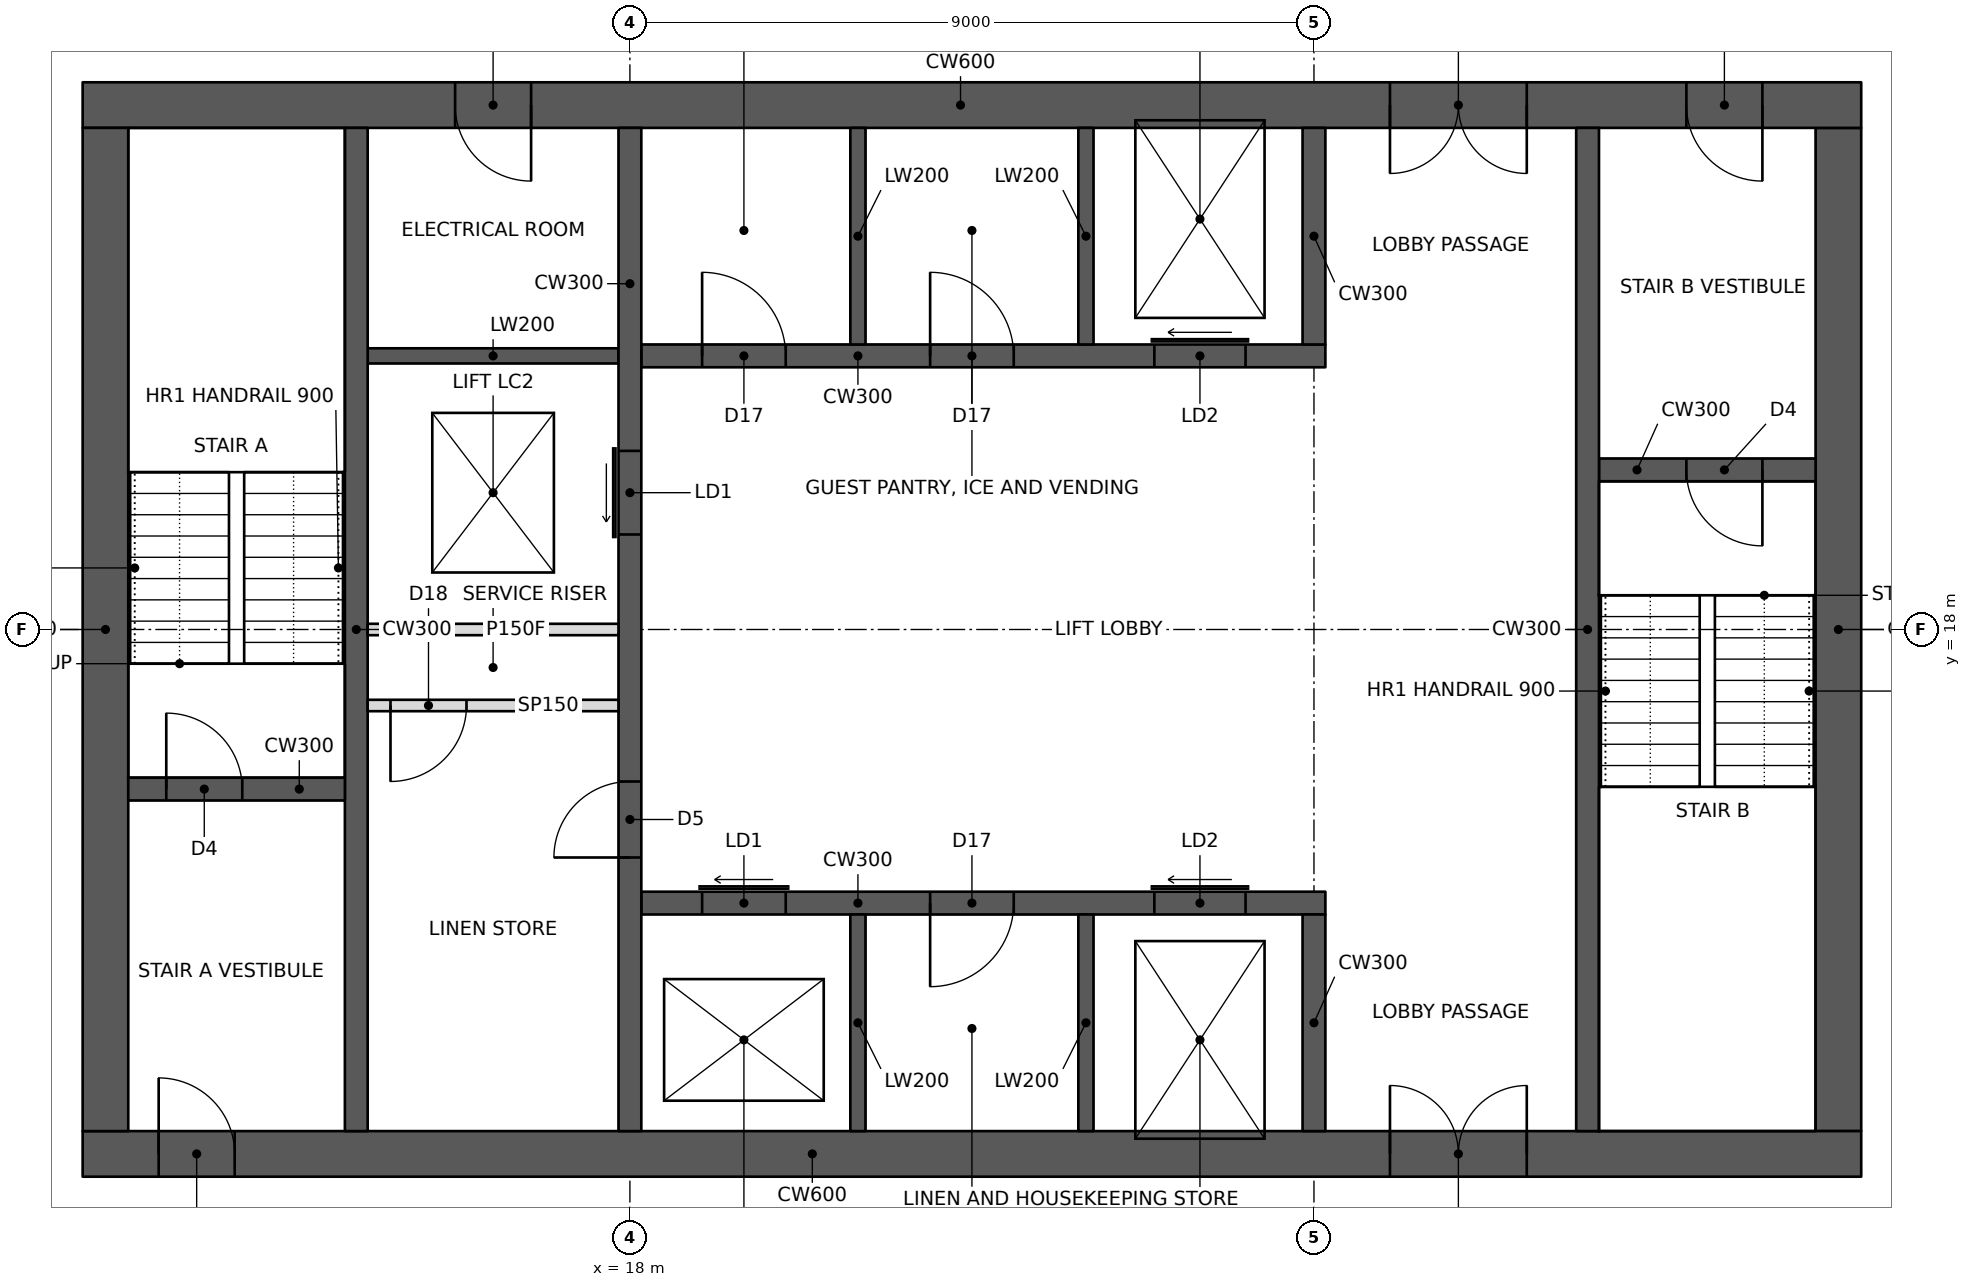
"""IFC4 building model, lengths in metres.
Left out: names, types, materials, properties, quantities, classifications, styles, units other than length and angle.
Written with IfcOpenShell. Run it as: python <this file> out.ifc"""

import sys

from ifc_helpers import new_model, si_unit, direction, frame, frame_2d, origin, place, context, subcontext, project, spatial, rectangle, extrude, element, fill, save


model = new_model("IFC4")
c1 = context("Model", 3, precision=1e-05, world=origin(), true_north=direction((0.0, 1.0)))
c2 = subcontext(c1, "Body", "Model", "MODEL_VIEW")
j1 = project(units=[si_unit("LENGTHUNIT", "METRE"), si_unit("PLANEANGLEUNIT", "RADIAN")], contexts=[c1])
p1 = place(None, origin())
s1 = spatial("IfcSite", under=j1, at=p1, CompositionType="ELEMENT")
p2 = place(p1, origin())
s2 = spatial("IfcBuilding", under=s1, at=p2, CompositionType="ELEMENT")
p3 = place(p2, frame((0.0, 0.0, 214.8)))
s3 = spatial("IfcBuildingStorey", under=s2, at=p3, CompositionType="ELEMENT", Elevation=214.8)
p4 = place(p3, frame((10.8, 11.1, 0.0), z_axis=(0.0, 0.0, 1.0), x_axis=(1.0, 0.0, 0.0)))
e1 = element("IfcWall", 1, at=p4, inside=s3, PredefinedType="SHEAR", context=c2, shape_type="SweptSolid", body=[
    extrude(rectangle(XDim=23.4, YDim=0.6, at=frame_2d((11.7, 0.0))), origin(), (0.0, 0.0, 1.0), 3.4),
])
p5 = place(p4, frame((1.0, 0.0, 0.0)))
e2 = element("IfcOpeningElement", 2, at=p5, cuts=e1, PredefinedType="OPENING", context=c2, shape_type="SweptSolid", body=[
    extrude(rectangle(XDim=1.0, YDim=2.1, at=frame_2d((0.5, 1.05))), frame((0.0, 0.31, 0.0), z_axis=(0.0, -1.0, 0.0), x_axis=(1.0, 0.0, 0.0)), (0.0, 0.0, 1.0), 0.62),
])
p6 = place(p4, frame((17.2, 0.0, 0.0)))
e3 = element("IfcOpeningElement", 3, at=p6, cuts=e1, PredefinedType="OPENING", context=c2, shape_type="SweptSolid", body=[
    extrude(rectangle(XDim=1.8, YDim=2.1, at=frame_2d((0.9, 1.05))), frame((0.0, 0.31, 0.0), z_axis=(0.0, -1.0, 0.0), x_axis=(1.0, 0.0, 0.0)), (0.0, 0.0, 1.0), 0.62),
])
p7 = place(p3, frame((10.8, 24.9, 0.0), z_axis=(0.0, 0.0, 1.0), x_axis=(1.0, 0.0, 0.0)))
e4 = element("IfcWall", 4, at=p7, inside=s3, PredefinedType="SHEAR", context=c2, shape_type="SweptSolid", body=[
    extrude(rectangle(XDim=23.4, YDim=0.6, at=frame_2d((11.7, 0.0))), origin(), (0.0, 0.0, 1.0), 3.4),
])
p8 = place(p7, frame((17.2, 0.0, 0.0)))
e5 = element("IfcOpeningElement", 5, at=p8, cuts=e4, PredefinedType="OPENING", context=c2, shape_type="SweptSolid", body=[
    extrude(rectangle(XDim=1.8, YDim=2.1, at=frame_2d((0.9, 1.05))), frame((0.0, 0.31, 0.0), z_axis=(0.0, -1.0, 0.0), x_axis=(1.0, 0.0, 0.0)), (0.0, 0.0, 1.0), 0.62),
])
p9 = place(p7, frame((21.1, 0.0, 0.0)))
e6 = element("IfcOpeningElement", 6, at=p9, cuts=e4, PredefinedType="OPENING", context=c2, shape_type="SweptSolid", body=[
    extrude(rectangle(XDim=1.0, YDim=2.1, at=frame_2d((0.5, 1.05))), frame((0.0, 0.31, 0.0), z_axis=(0.0, -1.0, 0.0), x_axis=(1.0, 0.0, 0.0)), (0.0, 0.0, 1.0), 0.62),
])
p10 = place(p7, frame((4.9, 0.0, 0.0)))
e7 = element("IfcOpeningElement", 7, at=p10, cuts=e4, PredefinedType="OPENING", context=c2, shape_type="SweptSolid", body=[
    extrude(rectangle(XDim=1.0, YDim=2.1, at=frame_2d((0.5, 1.05))), frame((0.0, 0.31, 0.0), z_axis=(0.0, -1.0, 0.0), x_axis=(1.0, 0.0, 0.0)), (0.0, 0.0, 1.0), 0.62),
])
for number, where, z_axis, x_axis in (
    (8, (11.1, 11.4, 0.0), (0.0, 0.0, 1.0), (0.0, 1.0, 0.0)),
    (9, (33.9, 11.4, 0.0), (0.0, 0.0, 1.0), (0.0, 1.0, 0.0)),
):
    element("IfcWall", number, at=place(p3, frame(where, z_axis=z_axis, x_axis=x_axis)), inside=s3, PredefinedType="SHEAR", context=c2, shape_type="SweptSolid", body=[
        extrude(rectangle(XDim=13.2, YDim=0.6, at=frame_2d((6.6, 0.0))), origin(), (0.0, 0.0, 1.0), 3.4),
    ])
p11 = place(p3, frame((14.4, 11.4, 0.0), z_axis=(0.0, 0.0, 1.0), x_axis=(0.0, 1.0, 0.0)))
e10 = element("IfcWall", 10, at=p11, inside=s3, PredefinedType="SHEAR", context=c2, shape_type="SweptSolid", body=[
    extrude(rectangle(XDim=13.2, YDim=0.3, at=frame_2d((6.6, 0.0))), origin(), (0.0, 0.0, 1.0), 3.4),
])
p12 = place(p3, frame((11.4, 15.9, 0.0), z_axis=(0.0, 0.0, 1.0), x_axis=(1.0, 0.0, 0.0)))
e11 = element("IfcWall", 11, at=p12, inside=s3, PredefinedType="SHEAR", context=c2, shape_type="SweptSolid", body=[
    extrude(rectangle(XDim=2.85, YDim=0.3, at=frame_2d((1.425, 0.0))), origin(), (0.0, 0.0, 1.0), 3.4),
])
p13 = place(p12, frame((0.5, 0.0, 0.0)))
e12 = element("IfcOpeningElement", 12, at=p13, cuts=e11, PredefinedType="OPENING", context=c2, shape_type="SweptSolid", body=[
    extrude(rectangle(XDim=1.0, YDim=2.1, at=frame_2d((0.5, 1.05))), frame((0.0, 0.16, 0.0), z_axis=(0.0, -1.0, 0.0), x_axis=(1.0, 0.0, 0.0)), (0.0, 0.0, 1.0), 0.32),
])
p14 = place(p3, frame((18.0, 11.4, 0.0), z_axis=(0.0, 0.0, 1.0), x_axis=(0.0, 1.0, 0.0)))
e13 = element("IfcWall", 13, at=p14, inside=s3, PredefinedType="SHEAR", context=c2, shape_type="SweptSolid", body=[
    extrude(rectangle(XDim=13.2, YDim=0.3, at=frame_2d((6.6, 0.0))), origin(), (0.0, 0.0, 1.0), 3.4),
])
p15 = place(p14, frame((3.6, 0.0, 0.0)))
e14 = element("IfcOpeningElement", 14, at=p15, cuts=e13, PredefinedType="OPENING", context=c2, shape_type="SweptSolid", body=[
    extrude(rectangle(XDim=1.0, YDim=2.1, at=frame_2d((0.5, 1.05))), frame((0.0, 0.16, 0.0), z_axis=(0.0, -1.0, 0.0), x_axis=(1.0, 0.0, 0.0)), (0.0, 0.0, 1.0), 0.32),
])
p16 = place(p14, frame((7.85, 0.0, 0.0)))
e15 = element("IfcOpeningElement", 15, at=p16, cuts=e13, PredefinedType="OPENING", context=c2, shape_type="SweptSolid", body=[
    extrude(rectangle(XDim=1.1, YDim=2.1, at=frame_2d((0.55, 1.05))), frame((0.0, 0.16, 0.0), z_axis=(0.0, -1.0, 0.0), x_axis=(1.0, 0.0, 0.0)), (0.0, 0.0, 1.0), 0.32),
])
p17 = place(p3, frame((14.55, 18.0, 0.0), z_axis=(0.0, 0.0, 1.0), x_axis=(1.0, 0.0, 0.0)))
e16 = element("IfcWall", 16, at=p17, inside=s3, PredefinedType="PARTITIONING", context=c2, shape_type="SweptSolid", body=[
    extrude(rectangle(XDim=3.3, YDim=0.15, at=frame_2d((1.65, 0.0))), origin(), (0.0, 0.0, 1.0), 3.2),
])
p18 = place(p3, frame((18.15, 14.4, 0.0), z_axis=(0.0, 0.0, 1.0), x_axis=(1.0, 0.0, 0.0)))
e17 = element("IfcWall", 17, at=p18, inside=s3, PredefinedType="SHEAR", context=c2, shape_type="SweptSolid", body=[
    extrude(rectangle(XDim=9.0, YDim=0.3, at=frame_2d((4.5, 0.0))), origin(), (0.0, 0.0, 1.0), 3.4),
])
p19 = place(p18, frame((0.8, 0.0, 0.0)))
e18 = element("IfcOpeningElement", 18, at=p19, cuts=e17, PredefinedType="OPENING", context=c2, shape_type="SweptSolid", body=[
    extrude(rectangle(XDim=1.1, YDim=2.1, at=frame_2d((0.55, 1.05))), frame((0.0, 0.16, 0.0), z_axis=(0.0, -1.0, 0.0), x_axis=(1.0, 0.0, 0.0)), (0.0, 0.0, 1.0), 0.32),
])
p20 = place(p18, frame((6.75, 0.0, 0.0)))
e19 = element("IfcOpeningElement", 19, at=p20, cuts=e17, PredefinedType="OPENING", context=c2, shape_type="SweptSolid", body=[
    extrude(rectangle(XDim=1.2, YDim=2.1, at=frame_2d((0.6, 1.05))), frame((0.0, 0.16, 0.0), z_axis=(0.0, -1.0, 0.0), x_axis=(1.0, 0.0, 0.0)), (0.0, 0.0, 1.0), 0.32),
])
p21 = place(p18, frame((3.8, 0.0, 0.0)))
e20 = element("IfcOpeningElement", 20, at=p21, cuts=e17, PredefinedType="OPENING", context=c2, shape_type="SweptSolid", body=[
    extrude(rectangle(XDim=1.1, YDim=2.1, at=frame_2d((0.55, 1.05))), frame((0.0, 0.16, 0.0), z_axis=(0.0, -1.0, 0.0), x_axis=(1.0, 0.0, 0.0)), (0.0, 0.0, 1.0), 0.32),
])
p22 = place(p3, frame((27.0, 11.4, 0.0), z_axis=(0.0, 0.0, 1.0), x_axis=(0.0, 1.0, 0.0)))
e21 = element("IfcWall", 21, at=p22, inside=s3, PredefinedType="SHEAR", context=c2, shape_type="SweptSolid", body=[
    extrude(rectangle(XDim=2.85, YDim=0.3, at=frame_2d((1.425, 0.0))), origin(), (0.0, 0.0, 1.0), 3.4),
])
for number, where, z_axis, x_axis in (
    (22, (21.0, 11.4, 0.0), (0.0, 0.0, 1.0), (0.0, 1.0, 0.0)),
    (23, (24.0, 11.4, 0.0), (0.0, 0.0, 1.0), (0.0, 1.0, 0.0)),
):
    element("IfcWall", number, at=place(p3, frame(where, z_axis=z_axis, x_axis=x_axis)), inside=s3, PredefinedType="SHEAR", context=c2, shape_type="SweptSolid", body=[
        extrude(rectangle(XDim=2.85, YDim=0.2, at=frame_2d((1.425, 0.0))), origin(), (0.0, 0.0, 1.0), 3.4),
    ])
p23 = place(p3, frame((18.15, 21.6, 0.0), z_axis=(0.0, 0.0, 1.0), x_axis=(1.0, 0.0, 0.0)))
e24 = element("IfcWall", 24, at=p23, inside=s3, PredefinedType="SHEAR", context=c2, shape_type="SweptSolid", body=[
    extrude(rectangle(XDim=9.0, YDim=0.3, at=frame_2d((4.5, 0.0))), origin(), (0.0, 0.0, 1.0), 3.4),
])
p24 = place(p23, frame((6.75, 0.0, 0.0)))
e25 = element("IfcOpeningElement", 25, at=p24, cuts=e24, PredefinedType="OPENING", context=c2, shape_type="SweptSolid", body=[
    extrude(rectangle(XDim=1.2, YDim=2.1, at=frame_2d((0.6, 1.05))), frame((0.0, 0.16, 0.0), z_axis=(0.0, -1.0, 0.0), x_axis=(1.0, 0.0, 0.0)), (0.0, 0.0, 1.0), 0.32),
])
p25 = place(p23, frame((0.8, 0.0, 0.0)))
e26 = element("IfcOpeningElement", 26, at=p25, cuts=e24, PredefinedType="OPENING", context=c2, shape_type="SweptSolid", body=[
    extrude(rectangle(XDim=1.1, YDim=2.1, at=frame_2d((0.55, 1.05))), frame((0.0, 0.16, 0.0), z_axis=(0.0, -1.0, 0.0), x_axis=(1.0, 0.0, 0.0)), (0.0, 0.0, 1.0), 0.32),
])
p26 = place(p23, frame((3.8, 0.0, 0.0)))
e27 = element("IfcOpeningElement", 27, at=p26, cuts=e24, PredefinedType="OPENING", context=c2, shape_type="SweptSolid", body=[
    extrude(rectangle(XDim=1.1, YDim=2.1, at=frame_2d((0.55, 1.05))), frame((0.0, 0.16, 0.0), z_axis=(0.0, -1.0, 0.0), x_axis=(1.0, 0.0, 0.0)), (0.0, 0.0, 1.0), 0.32),
])
p27 = place(p3, frame((27.0, 21.75, 0.0), z_axis=(0.0, 0.0, 1.0), x_axis=(0.0, 1.0, 0.0)))
e28 = element("IfcWall", 28, at=p27, inside=s3, PredefinedType="SHEAR", context=c2, shape_type="SweptSolid", body=[
    extrude(rectangle(XDim=2.85, YDim=0.3, at=frame_2d((1.425, 0.0))), origin(), (0.0, 0.0, 1.0), 3.4),
])
for number, where, z_axis, x_axis in (
    (29, (21.0, 21.75, 0.0), (0.0, 0.0, 1.0), (0.0, 1.0, 0.0)),
    (30, (24.0, 21.75, 0.0), (0.0, 0.0, 1.0), (0.0, 1.0, 0.0)),
):
    element("IfcWall", number, at=place(p3, frame(where, z_axis=z_axis, x_axis=x_axis)), inside=s3, PredefinedType="SHEAR", context=c2, shape_type="SweptSolid", body=[
        extrude(rectangle(XDim=2.85, YDim=0.2, at=frame_2d((1.425, 0.0))), origin(), (0.0, 0.0, 1.0), 3.4),
    ])
p28 = place(p3, frame((30.6, 11.4, 0.0), z_axis=(0.0, 0.0, 1.0), x_axis=(0.0, 1.0, 0.0)))
e31 = element("IfcWall", 31, at=p28, inside=s3, PredefinedType="SHEAR", context=c2, shape_type="SweptSolid", body=[
    extrude(rectangle(XDim=13.2, YDim=0.3, at=frame_2d((6.6, 0.0))), origin(), (0.0, 0.0, 1.0), 3.4),
])
p29 = place(p3, frame((30.75, 20.1, 0.0), z_axis=(0.0, 0.0, 1.0), x_axis=(1.0, 0.0, 0.0)))
e32 = element("IfcWall", 32, at=p29, inside=s3, PredefinedType="SHEAR", context=c2, shape_type="SweptSolid", body=[
    extrude(rectangle(XDim=2.85, YDim=0.3, at=frame_2d((1.425, 0.0))), origin(), (0.0, 0.0, 1.0), 3.4),
])
p30 = place(p29, frame((1.15, 0.0, 0.0)))
e33 = element("IfcOpeningElement", 33, at=p30, cuts=e32, PredefinedType="OPENING", context=c2, shape_type="SweptSolid", body=[
    extrude(rectangle(XDim=1.0, YDim=2.1, at=frame_2d((0.5, 1.05))), frame((0.0, 0.16, 0.0), z_axis=(0.0, -1.0, 0.0), x_axis=(1.0, 0.0, 0.0)), (0.0, 0.0, 1.0), 0.32),
])
p31 = place(p3, frame((14.55, 21.6, 0.0), z_axis=(0.0, 0.0, 1.0), x_axis=(1.0, 0.0, 0.0)))
e34 = element("IfcWall", 34, at=p31, inside=s3, PredefinedType="SHEAR", context=c2, shape_type="SweptSolid", body=[
    extrude(rectangle(XDim=3.3, YDim=0.2, at=frame_2d((1.65, 0.0))), origin(), (0.0, 0.0, 1.0), 3.4),
])
p32 = place(p3, frame((14.55, 17.0, 0.0), z_axis=(0.0, 0.0, 1.0), x_axis=(1.0, 0.0, 0.0)))
e35 = element("IfcWall", 35, at=p32, inside=s3, PredefinedType="PARTITIONING", context=c2, shape_type="SweptSolid", body=[
    extrude(rectangle(XDim=3.3, YDim=0.15, at=frame_2d((1.65, 0.0))), origin(), (0.0, 0.0, 1.0), 3.2),
])
p33 = place(p32, frame((0.3, 0.0, 0.0)))
e36 = element("IfcOpeningElement", 36, at=p33, cuts=e35, PredefinedType="OPENING", context=c2, shape_type="SweptSolid", body=[
    extrude(rectangle(XDim=1.0, YDim=2.1, at=frame_2d((0.5, 1.05))), frame((0.0, 0.085, 0.0), z_axis=(0.0, -1.0, 0.0), x_axis=(1.0, 0.0, 0.0)), (0.0, 0.0, 1.0), 0.17),
])
p34 = place(p33, frame((1.0, 0.0, 0.0), z_axis=(0.0, 0.0, 1.0), x_axis=(-1.0, 0.0, 0.0)))
e37 = element("IfcDoor", 37, at=p34, inside=s3, OperationType="SINGLE_SWING_RIGHT", PredefinedType="DOOR", context=c2, shape_type="SweptSolid", body=[
    extrude(rectangle(XDim=1.0, YDim=2.1, at=frame_2d((0.5, 1.05))), frame((0.0, 0.025, 0.0), z_axis=(0.0, -1.0, 0.0), x_axis=(1.0, 0.0, 0.0)), (0.0, 0.0, 1.0), 0.05),
])
fill(e36, e37)
p35 = place(p5, origin())
e38 = element("IfcDoor", 38, at=p35, inside=s3, OperationType="SINGLE_SWING_LEFT", PredefinedType="DOOR", context=c2, shape_type="SweptSolid", body=[
    extrude(rectangle(XDim=1.0, YDim=2.1, at=frame_2d((0.5, 1.05))), frame((0.0, 0.025, 0.0), z_axis=(0.0, -1.0, 0.0), x_axis=(1.0, 0.0, 0.0)), (0.0, 0.0, 1.0), 0.05),
])
fill(e2, e38)
p36 = place(p13, origin())
e39 = element("IfcDoor", 39, at=p36, inside=s3, OperationType="SINGLE_SWING_LEFT", PredefinedType="DOOR", context=c2, shape_type="SweptSolid", body=[
    extrude(rectangle(XDim=1.0, YDim=2.1, at=frame_2d((0.5, 1.05))), frame((0.0, 0.025, 0.0), z_axis=(0.0, -1.0, 0.0), x_axis=(1.0, 0.0, 0.0)), (0.0, 0.0, 1.0), 0.05),
])
fill(e12, e39)
p37 = place(p6, origin())
e40 = element("IfcDoor", 40, at=p37, inside=s3, OperationType="DOUBLE_DOOR_SINGLE_SWING", PredefinedType="DOOR", context=c2, shape_type="SweptSolid", body=[
    extrude(rectangle(XDim=1.8, YDim=2.1, at=frame_2d((0.9, 1.05))), frame((0.0, 0.025, 0.0), z_axis=(0.0, -1.0, 0.0), x_axis=(1.0, 0.0, 0.0)), (0.0, 0.0, 1.0), 0.05),
])
fill(e3, e40)
p38 = place(p8, frame((1.8, 0.0, 0.0), z_axis=(0.0, 0.0, 1.0), x_axis=(-1.0, 0.0, 0.0)))
e41 = element("IfcDoor", 41, at=p38, inside=s3, OperationType="DOUBLE_DOOR_SINGLE_SWING", PredefinedType="DOOR", context=c2, shape_type="SweptSolid", body=[
    extrude(rectangle(XDim=1.8, YDim=2.1, at=frame_2d((0.9, 1.05))), frame((0.0, 0.025, 0.0), z_axis=(0.0, -1.0, 0.0), x_axis=(1.0, 0.0, 0.0)), (0.0, 0.0, 1.0), 0.05),
])
fill(e5, e41)
p39 = place(p9, frame((1.0, 0.0, 0.0), z_axis=(0.0, 0.0, 1.0), x_axis=(-1.0, 0.0, 0.0)))
e42 = element("IfcDoor", 42, at=p39, inside=s3, OperationType="SINGLE_SWING_LEFT", PredefinedType="DOOR", context=c2, shape_type="SweptSolid", body=[
    extrude(rectangle(XDim=1.0, YDim=2.1, at=frame_2d((0.5, 1.05))), frame((0.0, 0.025, 0.0), z_axis=(0.0, -1.0, 0.0), x_axis=(1.0, 0.0, 0.0)), (0.0, 0.0, 1.0), 0.05),
])
fill(e6, e42)
p40 = place(p30, frame((1.0, 0.0, 0.0), z_axis=(0.0, 0.0, 1.0), x_axis=(-1.0, 0.0, 0.0)))
e43 = element("IfcDoor", 43, at=p40, inside=s3, OperationType="SINGLE_SWING_LEFT", PredefinedType="DOOR", context=c2, shape_type="SweptSolid", body=[
    extrude(rectangle(XDim=1.0, YDim=2.1, at=frame_2d((0.5, 1.05))), frame((0.0, 0.025, 0.0), z_axis=(0.0, -1.0, 0.0), x_axis=(1.0, 0.0, 0.0)), (0.0, 0.0, 1.0), 0.05),
])
fill(e33, e43)
p41 = place(p15, origin())
e44 = element("IfcDoor", 44, at=p41, inside=s3, OperationType="SINGLE_SWING_LEFT", PredefinedType="DOOR", context=c2, shape_type="SweptSolid", body=[
    extrude(rectangle(XDim=1.0, YDim=2.1, at=frame_2d((0.5, 1.05))), frame((0.0, 0.025, 0.0), z_axis=(0.0, -1.0, 0.0), x_axis=(1.0, 0.0, 0.0)), (0.0, 0.0, 1.0), 0.05),
])
fill(e14, e44)
p42 = place(p10, frame((1.0, 0.0, 0.0), z_axis=(0.0, 0.0, 1.0), x_axis=(-1.0, 0.0, 0.0)))
e45 = element("IfcDoor", 45, at=p42, inside=s3, OperationType="SINGLE_SWING_LEFT", PredefinedType="DOOR", context=c2, shape_type="SweptSolid", body=[
    extrude(rectangle(XDim=1.0, YDim=2.1, at=frame_2d((0.5, 1.05))), frame((0.0, 0.025, 0.0), z_axis=(0.0, -1.0, 0.0), x_axis=(1.0, 0.0, 0.0)), (0.0, 0.0, 1.0), 0.05),
])
fill(e7, e45)
p43 = place(p19, origin())
e46 = element("IfcDoor", 46, at=p43, inside=s3, OperationType="SLIDING_TO_LEFT", PredefinedType="DOOR", context=c2, shape_type="SweptSolid", body=[
    extrude(rectangle(XDim=1.1, YDim=2.1, at=frame_2d((0.55, 1.05))), frame((0.0, 0.025, 0.0), z_axis=(0.0, -1.0, 0.0), x_axis=(1.0, 0.0, 0.0)), (0.0, 0.0, 1.0), 0.05),
])
fill(e18, e46)
p44 = place(p16, origin())
e47 = element("IfcDoor", 47, at=p44, inside=s3, OperationType="SLIDING_TO_LEFT", PredefinedType="DOOR", context=c2, shape_type="SweptSolid", body=[
    extrude(rectangle(XDim=1.1, YDim=2.1, at=frame_2d((0.55, 1.05))), frame((0.0, 0.025, 0.0), z_axis=(0.0, -1.0, 0.0), x_axis=(1.0, 0.0, 0.0)), (0.0, 0.0, 1.0), 0.05),
])
fill(e15, e47)
p45 = place(p20, origin())
e48 = element("IfcDoor", 48, at=p45, inside=s3, OperationType="SLIDING_TO_LEFT", PredefinedType="DOOR", context=c2, shape_type="SweptSolid", body=[
    extrude(rectangle(XDim=1.2, YDim=2.1, at=frame_2d((0.6, 1.05))), frame((0.0, 0.025, 0.0), z_axis=(0.0, -1.0, 0.0), x_axis=(1.0, 0.0, 0.0)), (0.0, 0.0, 1.0), 0.05),
])
fill(e19, e48)
p46 = place(p24, origin())
e49 = element("IfcDoor", 49, at=p46, inside=s3, OperationType="SLIDING_TO_LEFT", PredefinedType="DOOR", context=c2, shape_type="SweptSolid", body=[
    extrude(rectangle(XDim=1.2, YDim=2.1, at=frame_2d((0.6, 1.05))), frame((0.0, 0.025, 0.0), z_axis=(0.0, -1.0, 0.0), x_axis=(1.0, 0.0, 0.0)), (0.0, 0.0, 1.0), 0.05),
])
fill(e25, e49)
p47 = place(p25, origin())
e50 = element("IfcDoor", 50, at=p47, inside=s3, OperationType="SINGLE_SWING_LEFT", PredefinedType="DOOR", context=c2, shape_type="SweptSolid", body=[
    extrude(rectangle(XDim=1.1, YDim=2.1, at=frame_2d((0.55, 1.05))), frame((0.0, 0.025, 0.0), z_axis=(0.0, -1.0, 0.0), x_axis=(1.0, 0.0, 0.0)), (0.0, 0.0, 1.0), 0.05),
])
fill(e26, e50)
p48 = place(p26, origin())
e51 = element("IfcDoor", 51, at=p48, inside=s3, OperationType="SINGLE_SWING_LEFT", PredefinedType="DOOR", context=c2, shape_type="SweptSolid", body=[
    extrude(rectangle(XDim=1.1, YDim=2.1, at=frame_2d((0.55, 1.05))), frame((0.0, 0.025, 0.0), z_axis=(0.0, -1.0, 0.0), x_axis=(1.0, 0.0, 0.0)), (0.0, 0.0, 1.0), 0.05),
])
fill(e27, e51)
p49 = place(p21, frame((1.1, 0.0, 0.0), z_axis=(0.0, 0.0, 1.0), x_axis=(-1.0, 0.0, 0.0)))
e52 = element("IfcDoor", 52, at=p49, inside=s3, OperationType="SINGLE_SWING_RIGHT", PredefinedType="DOOR", context=c2, shape_type="SweptSolid", body=[
    extrude(rectangle(XDim=1.1, YDim=2.1, at=frame_2d((0.55, 1.05))), frame((0.0, 0.025, 0.0), z_axis=(0.0, -1.0, 0.0), x_axis=(1.0, 0.0, 0.0)), (0.0, 0.0, 1.0), 0.05),
])
fill(e20, e52)
save(model, sys.argv[1])
